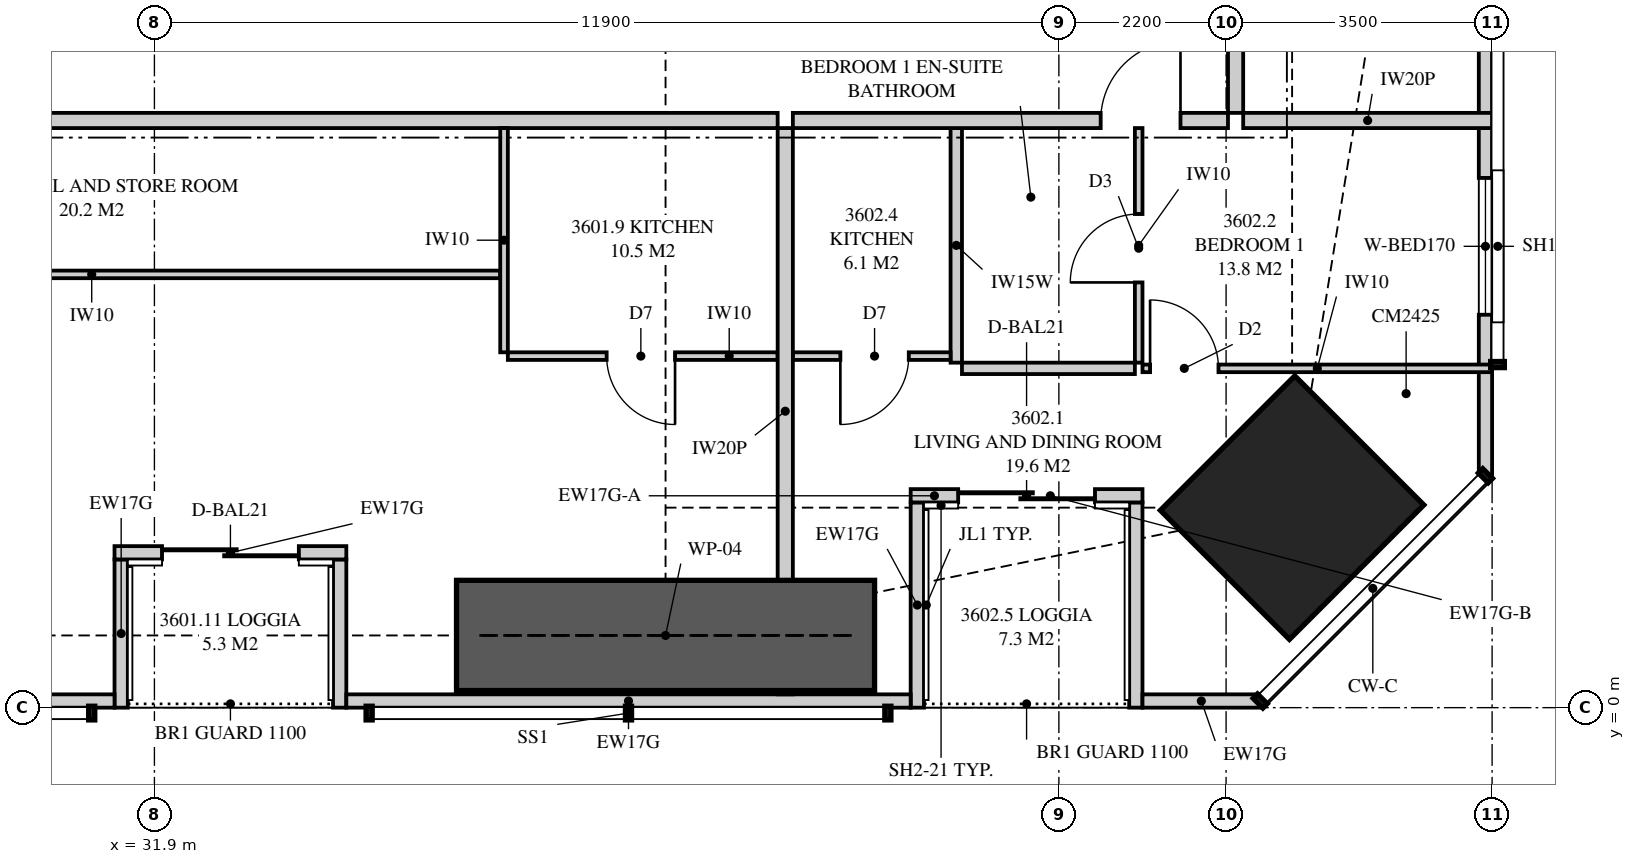
"""IFC4 building model, lengths in metres.
Left out: names, types, materials, properties, quantities, classifications, styles, units other than length and angle.
Written with IfcOpenShell. Run it as: python <this file> out.ifc"""

import sys

from ifc_helpers import new_model, si_unit, direction, frame, frame_2d, origin, origin_2d, place, context, subcontext, project, spatial, polyline, rectangle, outline, extrude, element, fill, save


model = new_model("IFC4")
c1 = context("Model", 3, precision=1e-05, world=origin(), true_north=direction((0.0, 1.0)))
c2 = subcontext(c1, "Body", "Model", "MODEL_VIEW")
j1 = project(units=[si_unit("LENGTHUNIT", "METRE"), si_unit("PLANEANGLEUNIT", "RADIAN")], contexts=[c1])
p1 = place(None, origin())
s1 = spatial("IfcSite", under=j1, at=p1, CompositionType="ELEMENT")
p2 = place(p1, origin())
s2 = spatial("IfcBuilding", under=s1, at=p2, CompositionType="ELEMENT")
p3 = place(p2, frame((0.0, 0.0, 131.65)))
s3 = spatial("IfcBuildingStorey", under=s2, at=p3, CompositionType="ELEMENT", Elevation=131.65)
p4 = place(p3, frame((46.869, 2.631, 0.0), z_axis=(0.0, 0.0, 1.0), x_axis=(-0.707106781187, 0.707106781187, 0.0)))
e1 = element("IfcColumn", 1, at=p4, inside=s3, PredefinedType="COLUMN", context=c2, shape_type="SweptSolid", body=[
    extrude(rectangle(XDim=2.4, YDim=2.5, at=origin_2d()), origin(), (0.0, 0.0, 1.0), 3.35),
])
p5 = place(p3, frame((9.051, 0.087, 0.0), z_axis=(0.0, 0.0, 1.0), x_axis=(1.0, 0.0, 0.0)))
e2 = element("IfcWall", 2, at=p5, inside=s3, PredefinedType="SOLIDWALL", context=c2, shape_type="SweptSolid", body=[
    extrude(outline(polyline([(0.0, 0.0), (22.324, 0.0), (22.324, 2.15), (7.824, 2.15), (7.824, 3.11), (7.666, 3.11), (7.666, 2.15), (7.62, 2.15), (7.62, 3.11), (0.0, 3.11), (0.0, 0.0)])), frame((0.0, 0.087, 0.0), z_axis=(0.0, -1.0, 0.0), x_axis=(1.0, 0.0, 0.0)), (0.0, 0.0, 1.0), 0.175),
])
p6 = place(p5, frame((3.134, 0.0, 0.4)))
e3 = element("IfcOpeningElement", 3, at=p6, cuts=e2, PredefinedType="OPENING", context=c2, shape_type="SweptSolid", body=[
    extrude(rectangle(XDim=1.8, YDim=1.7, at=frame_2d((0.9, 0.85))), frame((0.0, 0.097, 0.0), z_axis=(0.0, -1.0, 0.0), x_axis=(1.0, 0.0, 0.0)), (0.0, 0.0, 1.0), 0.195),
])
p7 = place(p5, frame((10.706, 0.0, 0.4)))
e4 = element("IfcOpeningElement", 4, at=p7, cuts=e2, PredefinedType="OPENING", context=c2, shape_type="SweptSolid", body=[
    extrude(rectangle(XDim=1.8, YDim=1.7, at=frame_2d((0.9, 0.85))), frame((0.0, 0.097, 0.0), z_axis=(0.0, -1.0, 0.0), x_axis=(1.0, 0.0, 0.0)), (0.0, 0.0, 1.0), 0.195),
])
p8 = place(p5, frame((13.874, 0.0, 0.4)))
e5 = element("IfcOpeningElement", 5, at=p8, cuts=e2, PredefinedType="OPENING", context=c2, shape_type="SweptSolid", body=[
    extrude(rectangle(XDim=1.8, YDim=1.7, at=frame_2d((0.9, 0.85))), frame((0.0, 0.097, 0.0), z_axis=(0.0, -1.0, 0.0), x_axis=(1.0, 0.0, 0.0)), (0.0, 0.0, 1.0), 0.195),
])
p9 = place(p3, frame((34.425, 0.087, 0.0), z_axis=(0.0, 0.0, 1.0), x_axis=(1.0, 0.0, 0.0)))
e6 = element("IfcWall", 6, at=p9, inside=s3, PredefinedType="SOLIDWALL", context=c2, shape_type="SweptSolid", body=[
    extrude(outline(polyline([(0.0, 0.0), (7.425, 0.0), (7.425, 3.11), (4.403, 3.11), (4.403, 2.15), (4.358, 2.15), (4.358, 3.11), (4.2, 3.11), (4.2, 2.15), (0.0, 2.15), (0.0, 0.0)])), frame((0.0, 0.087, 0.0), z_axis=(0.0, -1.0, 0.0), x_axis=(1.0, 0.0, 0.0)), (0.0, 0.0, 1.0), 0.175),
])
p10 = place(p3, frame((44.9, 0.087, 0.0), z_axis=(0.0, 0.0, 1.0), x_axis=(1.0, 0.0, 0.0)))
e7 = element("IfcWall", 7, at=p10, inside=s3, PredefinedType="SOLIDWALL", context=c2, shape_type="SweptSolid", body=[
    extrude(rectangle(XDim=1.549, YDim=0.175, at=frame_2d((0.774, 0.0))), origin(), (0.0, 0.0, 1.0), 3.11),
])
p11 = place(p3, frame((31.375, 2.038, 0.0), z_axis=(0.0, 0.0, 1.0), x_axis=(1.0, 0.0, 0.0)))
e8 = element("IfcWall", 8, at=p11, inside=s3, PredefinedType="SOLIDWALL", context=c2, shape_type="SweptSolid", body=[
    extrude(rectangle(XDim=3.05, YDim=0.175, at=frame_2d((1.525, 0.0))), origin(), (0.0, 0.0, 1.0), 3.11),
])
p12 = place(p11, frame((0.625, 0.0, 0.0)))
e9 = element("IfcOpeningElement", 9, at=p12, cuts=e8, PredefinedType="OPENING", context=c2, shape_type="SweptSolid", body=[
    extrude(rectangle(XDim=1.8, YDim=2.1, at=frame_2d((0.9, 1.05))), frame((0.0, 0.097, 0.0), z_axis=(0.0, -1.0, 0.0), x_axis=(1.0, 0.0, 0.0)), (0.0, 0.0, 1.0), 0.195),
])
for number, where, z_axis, x_axis in (
    (10, (31.462, 0.0, 0.0), (0.0, 0.0, 1.0), (0.0, 1.0, 0.0)),
    (11, (34.337, 0.0, 0.0), (0.0, 0.0, 1.0), (0.0, 1.0, 0.0)),
):
    element("IfcWall", number, at=place(p3, frame(where, z_axis=z_axis, x_axis=x_axis)), inside=s3, PredefinedType="SOLIDWALL", context=c2, shape_type="SweptSolid", body=[
        extrude(outline(polyline([(0.0, 0.0), (1.95, 0.0), (1.95, 3.11), (1.75, 3.11), (1.75, 2.15), (0.15, 2.15), (0.15, 3.11), (0.0, 3.11), (0.0, 0.0)])), frame((0.0, 0.087, 0.0), z_axis=(0.0, -1.0, 0.0), x_axis=(1.0, 0.0, 0.0)), (0.0, 0.0, 1.0), 0.175),
    ])
p13 = place(p3, frame((41.85, 2.788, 0.0), z_axis=(0.0, 0.0, 1.0), x_axis=(1.0, 0.0, 0.0)))
e12 = element("IfcWall", 12, at=p13, inside=s3, PredefinedType="SOLIDWALL", context=c2, shape_type="SweptSolid", body=[
    extrude(rectangle(XDim=0.625, YDim=0.175, at=frame_2d((0.312, 0.0))), origin(), (0.0, 0.0, 1.0), 2.51),
])
p14 = place(p3, frame((42.475, 2.788, 0.0), z_axis=(0.0, 0.0, 1.0), x_axis=(1.0, 0.0, 0.0)))
e13 = element("IfcWall", 13, at=p14, inside=s3, PredefinedType="SOLIDWALL", context=c2, shape_type="SweptSolid", body=[
    extrude(rectangle(XDim=2.425, YDim=0.175, at=frame_2d((1.212, 0.0))), origin(), (0.0, 0.0, 1.0), 2.15),
])
p15 = place(p14, origin())
e14 = element("IfcOpeningElement", 14, at=p15, cuts=e13, PredefinedType="OPENING", context=c2, shape_type="SweptSolid", body=[
    extrude(rectangle(XDim=1.8, YDim=2.1, at=frame_2d((0.9, 1.05))), frame((0.0, 0.097, 0.0), z_axis=(0.0, -1.0, 0.0), x_axis=(1.0, 0.0, 0.0)), (0.0, 0.0, 1.0), 0.195),
])
p16 = place(p3, frame((41.938, 0.0, 0.0), z_axis=(0.0, 0.0, 1.0), x_axis=(0.0, 1.0, 0.0)))
e15 = element("IfcWall", 15, at=p16, inside=s3, PredefinedType="SOLIDWALL", context=c2, shape_type="SweptSolid", body=[
    extrude(outline(polyline([(0.0, 0.0), (2.7, 0.0), (2.7, 2.51), (2.46, 2.51), (2.46, 2.15), (0.791, 2.15), (0.791, 3.11), (0.0, 3.11), (0.0, 0.0)])), frame((0.0, 0.087, 0.0), z_axis=(0.0, -1.0, 0.0), x_axis=(1.0, 0.0, 0.0)), (0.0, 0.0, 1.0), 0.175),
])
p17 = place(p3, frame((44.812, 0.0, 0.0), z_axis=(0.0, 0.0, 1.0), x_axis=(0.0, 1.0, 0.0)))
e16 = element("IfcWall", 16, at=p17, inside=s3, PredefinedType="SOLIDWALL", context=c2, shape_type="SweptSolid", body=[
    extrude(outline(polyline([(0.0, 0.0), (2.7, 0.0), (2.7, 2.15), (1.378, 2.15), (1.378, 3.11), (0.0, 3.11), (0.0, 0.0)])), frame((0.0, 0.087, 0.0), z_axis=(0.0, -1.0, 0.0), x_axis=(1.0, 0.0, 0.0)), (0.0, 0.0, 1.0), 0.175),
])
p18 = place(p3, frame((49.413, 3.051, 0.0), z_axis=(0.0, 0.0, 1.0), x_axis=(0.0, 1.0, 0.0)))
e17 = element("IfcWall", 17, at=p18, inside=s3, PredefinedType="SOLIDWALL", context=c2, shape_type="SweptSolid", body=[
    extrude(outline(polyline([(0.0, 0.0), (31.897, 0.0), (31.897, 3.11), (22.167, 3.11), (22.167, 2.15), (22.074, 2.15), (22.074, 3.11), (21.949, 3.11), (21.949, 2.15), (9.949, 2.15), (9.949, 3.11), (9.823, 3.11), (9.823, 2.15), (9.73, 2.15), (9.73, 3.11), (0.0, 3.11), (0.0, 0.0)])), frame((0.0, 0.087, 0.0), z_axis=(0.0, -1.0, 0.0), x_axis=(1.0, 0.0, 0.0)), (0.0, 0.0, 1.0), 0.175),
])
p19 = place(p18, frame((2.118, 0.0, 0.4)))
e18 = element("IfcOpeningElement", 18, at=p19, cuts=e17, PredefinedType="OPENING", context=c2, shape_type="SweptSolid", body=[
    extrude(rectangle(XDim=1.8, YDim=1.7, at=frame_2d((0.9, 0.85))), frame((0.0, 0.097, 0.0), z_axis=(0.0, -1.0, 0.0), x_axis=(1.0, 0.0, 0.0)), (0.0, 0.0, 1.0), 0.195),
])
p20 = place(p18, frame((14.849, 0.0, 0.4)))
e19 = element("IfcOpeningElement", 19, at=p20, cuts=e17, PredefinedType="OPENING", context=c2, shape_type="SweptSolid", body=[
    extrude(rectangle(XDim=1.2, YDim=1.7, at=frame_2d((0.6, 0.85))), frame((0.0, 0.097, 0.0), z_axis=(0.0, -1.0, 0.0), x_axis=(1.0, 0.0, 0.0)), (0.0, 0.0, 1.0), 0.195),
])
p21 = place(p18, frame((28.51, 0.0, 0.4)))
e20 = element("IfcOpeningElement", 20, at=p21, cuts=e17, PredefinedType="OPENING", context=c2, shape_type="SweptSolid", body=[
    extrude(rectangle(XDim=1.2, YDim=1.7, at=frame_2d((0.6, 0.85))), frame((0.0, 0.097, 0.0), z_axis=(0.0, -1.0, 0.0), x_axis=(1.0, 0.0, 0.0)), (0.0, 0.0, 1.0), 0.195),
])
p22 = place(p3, frame((40.2, 0.175, 0.0), z_axis=(0.0, 0.0, 1.0), x_axis=(0.0, 1.0, 0.0)))
e21 = element("IfcWall", 21, at=p22, inside=s3, PredefinedType="PARTITIONING", context=c2, shape_type="SweptSolid", body=[
    extrude(outline(polyline([(0.167, 3.11), (0.0, 3.11), (0.0, 0.0), (0.529, 0.0), (0.529, 0.427), (1.021, 0.427), (1.021, 0.0), (7.45, 0.0), (7.45, 3.11), (3.766, 3.11), (3.766, 2.51), (2.025, 2.51), (2.025, 2.15), (1.021, 2.15), (1.021, 1.723), (0.529, 1.723), (0.529, 2.15), (0.167, 2.15), (0.167, 3.11)])), frame((0.0, 0.1, 0.0), z_axis=(0.0, -1.0, 0.0), x_axis=(1.0, 0.0, 0.0)), (0.0, 0.0, 1.0), 0.2),
])
p23 = place(p3, frame((17.775, 7.725, 0.0), z_axis=(0.0, 0.0, 1.0), x_axis=(1.0, 0.0, 0.0)))
e22 = element("IfcWall", 22, at=p23, inside=s3, PredefinedType="PARTITIONING", context=c2, shape_type="SweptSolid", body=[
    extrude(outline(polyline([(0.0, 0.0), (22.325, 0.0), (22.325, 3.11), (21.187, 3.11), (21.187, 2.541), (20.513, 2.541), (20.513, 3.11), (10.312, 3.11), (10.312, 2.541), (9.638, 2.541), (9.638, 3.11), (0.0, 3.11), (0.0, 0.0)])), frame((0.0, 0.1, 0.0), z_axis=(0.0, -1.0, 0.0), x_axis=(1.0, 0.0, 0.0)), (0.0, 0.0, 1.0), 0.2),
])
p24 = place(p23, frame((4.825, 0.0, 0.0)))
e23 = element("IfcOpeningElement", 23, at=p24, cuts=e22, PredefinedType="OPENING", context=c2, shape_type="SweptSolid", body=[
    extrude(rectangle(XDim=1.05, YDim=2.2, at=frame_2d((0.525, 1.1))), frame((0.0, 0.11, 0.0), z_axis=(0.0, -1.0, 0.0), x_axis=(1.0, 0.0, 0.0)), (0.0, 0.0, 1.0), 0.22),
])
p25 = place(p3, frame((36.55, 4.625, 0.0), z_axis=(0.0, 0.0, 1.0), x_axis=(1.0, 0.0, 0.0)))
e24 = element("IfcWall", 24, at=p25, inside=s3, PredefinedType="PARTITIONING", context=c2, shape_type="SweptSolid", body=[
    extrude(outline(polyline([(0.0, 0.0), (3.55, 0.0), (3.55, 3.11), (2.362, 3.11), (2.362, 2.541), (1.788, 2.541), (1.788, 3.11), (0.0, 3.11), (0.0, 0.0)])), frame((0.0, 0.05, 0.0), z_axis=(0.0, -1.0, 0.0), x_axis=(1.0, 0.0, 0.0)), (0.0, 0.0, 1.0), 0.1),
])
p26 = place(p25, frame((1.3, 0.0, 0.0)))
e25 = element("IfcOpeningElement", 25, at=p26, cuts=e24, PredefinedType="OPENING", context=c2, shape_type="SweptSolid", body=[
    extrude(rectangle(XDim=0.9, YDim=2.1, at=frame_2d((0.45, 1.05))), frame((0.0, 0.06, 0.0), z_axis=(0.0, -1.0, 0.0), x_axis=(1.0, 0.0, 0.0)), (0.0, 0.0, 1.0), 0.12),
])
p27 = place(p3, frame((36.5, 4.675, 0.0), z_axis=(0.0, 0.0, 1.0), x_axis=(0.0, 1.0, 0.0)))
e26 = element("IfcWall", 26, at=p27, inside=s3, PredefinedType="PARTITIONING", context=c2, shape_type="SweptSolid", body=[
    extrude(rectangle(XDim=2.95, YDim=0.1, at=frame_2d((1.475, 0.0))), origin(), (0.0, 0.0, 1.0), 3.11),
])
p28 = place(p3, frame((25.7, 5.7, 0.0), z_axis=(0.0, 0.0, 1.0), x_axis=(1.0, 0.0, 0.0)))
e27 = element("IfcWall", 27, at=p28, inside=s3, PredefinedType="PARTITIONING", context=c2, shape_type="SweptSolid", body=[
    extrude(outline(polyline([(0.0, 0.0), (10.75, 0.0), (10.75, 3.11), (2.337, 3.11), (2.337, 2.541), (1.763, 2.541), (1.763, 3.11), (0.0, 3.11), (0.0, 0.0)])), frame((0.0, 0.05, 0.0), z_axis=(0.0, -1.0, 0.0), x_axis=(1.0, 0.0, 0.0)), (0.0, 0.0, 1.0), 0.1),
])
p29 = place(p28, frame((0.3, 0.0, 0.0)))
e28 = element("IfcOpeningElement", 28, at=p29, cuts=e27, PredefinedType="OPENING", context=c2, shape_type="SweptSolid", body=[
    extrude(rectangle(XDim=1.0, YDim=2.1, at=frame_2d((0.5, 1.05))), frame((0.0, 0.06, 0.0), z_axis=(0.0, -1.0, 0.0), x_axis=(1.0, 0.0, 0.0)), (0.0, 0.0, 1.0), 0.12),
])
p30 = place(p3, frame((40.3, 7.725, 0.0), z_axis=(0.0, 0.0, 1.0), x_axis=(1.0, 0.0, 0.0)))
e29 = element("IfcWall", 29, at=p30, inside=s3, PredefinedType="PARTITIONING", context=c2, shape_type="SweptSolid", body=[
    extrude(rectangle(XDim=5.725, YDim=0.2, at=frame_2d((2.862, 0.0))), origin(), (0.0, 0.0, 1.0), 3.11),
])
p31 = place(p30, frame((4.05, 0.0, 0.0)))
e30 = element("IfcOpeningElement", 30, at=p31, cuts=e29, PredefinedType="OPENING", context=c2, shape_type="SweptSolid", body=[
    extrude(rectangle(XDim=1.05, YDim=2.2, at=frame_2d((0.525, 1.1))), frame((0.0, 0.11, 0.0), z_axis=(0.0, -1.0, 0.0), x_axis=(1.0, 0.0, 0.0)), (0.0, 0.0, 1.0), 0.22),
])
p32 = place(p3, frame((44.85, 4.539, 0.0), z_axis=(0.0, 0.0, 1.0), x_axis=(0.0, 1.0, 0.0)))
e31 = element("IfcWall", 31, at=p32, inside=s3, PredefinedType="PARTITIONING", context=c2, shape_type="SweptSolid", body=[
    extrude(rectangle(XDim=3.086, YDim=0.1, at=frame_2d((1.543, 0.0))), origin(), (0.0, 0.0, 1.0), 3.11),
])
p33 = place(p32, frame((1.056, 0.0, 0.0)))
e32 = element("IfcOpeningElement", 32, at=p33, cuts=e31, PredefinedType="OPENING", context=c2, shape_type="SweptSolid", body=[
    extrude(rectangle(XDim=0.9, YDim=2.1, at=frame_2d((0.45, 1.05))), frame((0.0, 0.06, 0.0), z_axis=(0.0, -1.0, 0.0), x_axis=(1.0, 0.0, 0.0)), (0.0, 0.0, 1.0), 0.12),
])
p34 = place(p3, frame((44.9, 4.464, 0.0), z_axis=(0.0, 0.0, 1.0), x_axis=(1.0, 0.0, 0.0)))
e33 = element("IfcWall", 33, at=p34, inside=s3, PredefinedType="PARTITIONING", context=c2, shape_type="SweptSolid", body=[
    extrude(outline(polyline([(0.0, 0.0), (4.6, 0.0), (4.6, 3.11), (3.137, 3.11), (3.137, 2.15), (1.395, 2.15), (1.395, 3.11), (0.0, 3.11), (0.0, 0.0)])), frame((0.0, 0.05, 0.0), z_axis=(0.0, -1.0, 0.0), x_axis=(1.0, 0.0, 0.0)), (0.0, 0.0, 1.0), 0.1),
])
p35 = place(p34, frame((0.1, 0.0, 0.0)))
e34 = element("IfcOpeningElement", 34, at=p35, cuts=e33, PredefinedType="OPENING", context=c2, shape_type="SweptSolid", body=[
    extrude(rectangle(XDim=0.9, YDim=2.1, at=frame_2d((0.45, 1.05))), frame((0.0, 0.06, 0.0), z_axis=(0.0, -1.0, 0.0), x_axis=(1.0, 0.0, 0.0)), (0.0, 0.0, 1.0), 0.12),
])
p36 = place(p3, frame((42.525, 4.464, 0.0), z_axis=(0.0, 0.0, 1.0), x_axis=(1.0, 0.0, 0.0)))
e35 = element("IfcWall", 35, at=p36, inside=s3, PredefinedType="PLUMBINGWALL", context=c2, shape_type="SweptSolid", body=[
    extrude(rectangle(XDim=2.275, YDim=0.15, at=frame_2d((1.138, 0.0))), origin(), (0.0, 0.0, 1.0), 3.11),
])
p37 = place(p3, frame((42.45, 4.539, 0.0), z_axis=(0.0, 0.0, 1.0), x_axis=(0.0, 1.0, 0.0)))
e36 = element("IfcWall", 36, at=p37, inside=s3, PredefinedType="PLUMBINGWALL", context=c2, shape_type="SweptSolid", body=[
    extrude(rectangle(XDim=3.086, YDim=0.15, at=frame_2d((1.543, 0.0))), origin(), (0.0, 0.0, 1.0), 3.11),
])
p38 = place(p3, frame((40.3, 4.625, 0.0), z_axis=(0.0, 0.0, 1.0), x_axis=(1.0, 0.0, 0.0)))
e37 = element("IfcWall", 37, at=p38, inside=s3, PredefinedType="PARTITIONING", context=c2, shape_type="SweptSolid", body=[
    extrude(rectangle(XDim=2.075, YDim=0.1, at=frame_2d((1.038, 0.0))), origin(), (0.0, 0.0, 1.0), 3.11),
])
p39 = place(p38, frame((0.625, 0.0, 0.0)))
e38 = element("IfcOpeningElement", 38, at=p39, cuts=e37, PredefinedType="OPENING", context=c2, shape_type="SweptSolid", body=[
    extrude(rectangle(XDim=0.9, YDim=2.1, at=frame_2d((0.45, 1.05))), frame((0.0, 0.06, 0.0), z_axis=(0.0, -1.0, 0.0), x_axis=(1.0, 0.0, 0.0)), (0.0, 0.0, 1.0), 0.12),
])
p40 = place(p3, frame((46.225, 7.725, 0.0), z_axis=(0.0, 0.0, 1.0), x_axis=(1.0, 0.0, 0.0)))
e39 = element("IfcWall", 39, at=p40, inside=s3, PredefinedType="PARTITIONING", context=c2, shape_type="SweptSolid", body=[
    extrude(outline(polyline([(0.0, 0.0), (3.275, 0.0), (3.275, 3.11), (2.392, 3.11), (2.392, 2.15), (0.643, 2.15), (0.643, 2.541), (0.306, 2.541), (0.306, 3.11), (0.0, 3.11), (0.0, 0.0)])), frame((0.0, 0.1, 0.0), z_axis=(0.0, -1.0, 0.0), x_axis=(1.0, 0.0, 0.0)), (0.0, 0.0, 1.0), 0.2),
])
p41 = place(p3, frame((46.125, 7.825, 0.0), z_axis=(0.0, 0.0, 1.0), x_axis=(0.0, 1.0, 0.0)))
e40 = element("IfcWall", 40, at=p41, inside=s3, PredefinedType="PARTITIONING", context=c2, shape_type="SweptSolid", body=[
    extrude(outline(polyline([(0.0, 0.0), (21.35, 0.0), (21.35, 3.11), (17.512, 3.11), (17.512, 2.541), (16.838, 2.541), (16.838, 3.11), (5.512, 3.11), (5.512, 2.541), (4.838, 2.541), (4.838, 3.11), (0.0, 3.11), (0.0, 0.0)])), frame((0.0, 0.1, 0.0), z_axis=(0.0, -1.0, 0.0), x_axis=(1.0, 0.0, 0.0)), (0.0, 0.0, 1.0), 0.2),
])
p42 = place(p41, frame((9.775, 0.0, 0.0)))
e41 = element("IfcOpeningElement", 41, at=p42, cuts=e40, PredefinedType="OPENING", context=c2, shape_type="SweptSolid", body=[
    extrude(rectangle(XDim=1.8, YDim=2.1, at=frame_2d((0.9, 1.05))), frame((0.0, 0.11, 0.0), z_axis=(0.0, -1.0, 0.0), x_axis=(1.0, 0.0, 0.0)), (0.0, 0.0, 1.0), 0.22),
])
p43 = place(p41, frame((19.5, 0.0, 0.0)))
e42 = element("IfcOpeningElement", 42, at=p43, cuts=e40, PredefinedType="OPENING", context=c2, shape_type="SweptSolid", body=[
    extrude(rectangle(XDim=1.0, YDim=2.1, at=frame_2d((0.5, 1.05))), frame((0.0, 0.11, 0.0), z_axis=(0.0, -1.0, 0.0), x_axis=(1.0, 0.0, 0.0)), (0.0, 0.0, 1.0), 0.22),
])
p44 = place(p3, frame((35.875, 0.95, 0.0), z_axis=(0.0, 0.0, 1.0), x_axis=(1.0, 0.0, 0.0)))
e43 = element("IfcWall", 43, at=p44, inside=s3, PredefinedType="SHEAR", context=c2, shape_type="SweptSolid", body=[
    extrude(rectangle(XDim=5.5, YDim=1.45, at=frame_2d((2.75, 0.0))), origin(), (0.0, 0.0, 1.0), 3.35),
])
p45 = place(p12, origin())
e44 = element("IfcDoor", 44, at=p45, inside=s3, OperationType="SLIDING_TO_LEFT", PredefinedType="DOOR", context=c2, shape_type="SweptSolid", body=[
    extrude(rectangle(XDim=1.8, YDim=2.1, at=frame_2d((0.9, 1.05))), frame((0.0, 0.025, 0.0), z_axis=(0.0, -1.0, 0.0), x_axis=(1.0, 0.0, 0.0)), (0.0, 0.0, 1.0), 0.05),
])
fill(e9, e44)
p46 = place(p15, origin())
e45 = element("IfcDoor", 45, at=p46, inside=s3, OperationType="SLIDING_TO_LEFT", PredefinedType="DOOR", context=c2, shape_type="SweptSolid", body=[
    extrude(rectangle(XDim=1.8, YDim=2.1, at=frame_2d((0.9, 1.05))), frame((0.0, 0.025, 0.0), z_axis=(0.0, -1.0, 0.0), x_axis=(1.0, 0.0, 0.0)), (0.0, 0.0, 1.0), 0.05),
])
fill(e14, e45)
p47 = place(p19, origin())
e46 = element("IfcWindow", 46, at=p47, inside=s3, PartitioningType="SINGLE_PANEL", PredefinedType="WINDOW", context=c2, shape_type="SweptSolid", body=[
    extrude(rectangle(XDim=1.8, YDim=1.7, at=frame_2d((0.9, 0.85))), frame((0.0, 0.03, 0.0), z_axis=(0.0, -1.0, 0.0), x_axis=(1.0, 0.0, 0.0)), (0.0, 0.0, 1.0), 0.06),
])
fill(e18, e46)
p48 = place(p26, frame((0.9, 0.0, 0.0), z_axis=(0.0, 0.0, 1.0), x_axis=(-1.0, 0.0, 0.0)))
e47 = element("IfcDoor", 47, at=p48, inside=s3, OperationType="SINGLE_SWING_LEFT", PredefinedType="DOOR", context=c2, shape_type="SweptSolid", body=[
    extrude(rectangle(XDim=0.9, YDim=2.1, at=frame_2d((0.45, 1.05))), frame((0.0, 0.025, 0.0), z_axis=(0.0, -1.0, 0.0), x_axis=(1.0, 0.0, 0.0)), (0.0, 0.0, 1.0), 0.05),
])
fill(e25, e47)
p49 = place(p31, origin())
e48 = element("IfcDoor", 48, at=p49, inside=s3, OperationType="SINGLE_SWING_RIGHT", PredefinedType="DOOR", context=c2, shape_type="SweptSolid", body=[
    extrude(rectangle(XDim=1.05, YDim=2.2, at=frame_2d((0.525, 1.1))), frame((0.0, 0.025, 0.0), z_axis=(0.0, -1.0, 0.0), x_axis=(1.0, 0.0, 0.0)), (0.0, 0.0, 1.0), 0.05),
])
fill(e30, e48)
p50 = place(p35, origin())
e49 = element("IfcDoor", 49, at=p50, inside=s3, OperationType="SINGLE_SWING_LEFT", PredefinedType="DOOR", context=c2, shape_type="SweptSolid", body=[
    extrude(rectangle(XDim=0.9, YDim=2.1, at=frame_2d((0.45, 1.05))), frame((0.0, 0.025, 0.0), z_axis=(0.0, -1.0, 0.0), x_axis=(1.0, 0.0, 0.0)), (0.0, 0.0, 1.0), 0.05),
])
fill(e34, e49)
p51 = place(p33, origin())
e50 = element("IfcDoor", 50, at=p51, inside=s3, OperationType="SINGLE_SWING_LEFT", PredefinedType="DOOR", context=c2, shape_type="SweptSolid", body=[
    extrude(rectangle(XDim=0.9, YDim=2.1, at=frame_2d((0.45, 1.05))), frame((0.0, 0.025, 0.0), z_axis=(0.0, -1.0, 0.0), x_axis=(1.0, 0.0, 0.0)), (0.0, 0.0, 1.0), 0.05),
])
fill(e32, e50)
p52 = place(p39, frame((0.9, 0.0, 0.0), z_axis=(0.0, 0.0, 1.0), x_axis=(-1.0, 0.0, 0.0)))
e51 = element("IfcDoor", 51, at=p52, inside=s3, OperationType="SINGLE_SWING_RIGHT", PredefinedType="DOOR", context=c2, shape_type="SweptSolid", body=[
    extrude(rectangle(XDim=0.9, YDim=2.1, at=frame_2d((0.45, 1.05))), frame((0.0, 0.025, 0.0), z_axis=(0.0, -1.0, 0.0), x_axis=(1.0, 0.0, 0.0)), (0.0, 0.0, 1.0), 0.05),
])
fill(e38, e51)
save(model, sys.argv[1])
